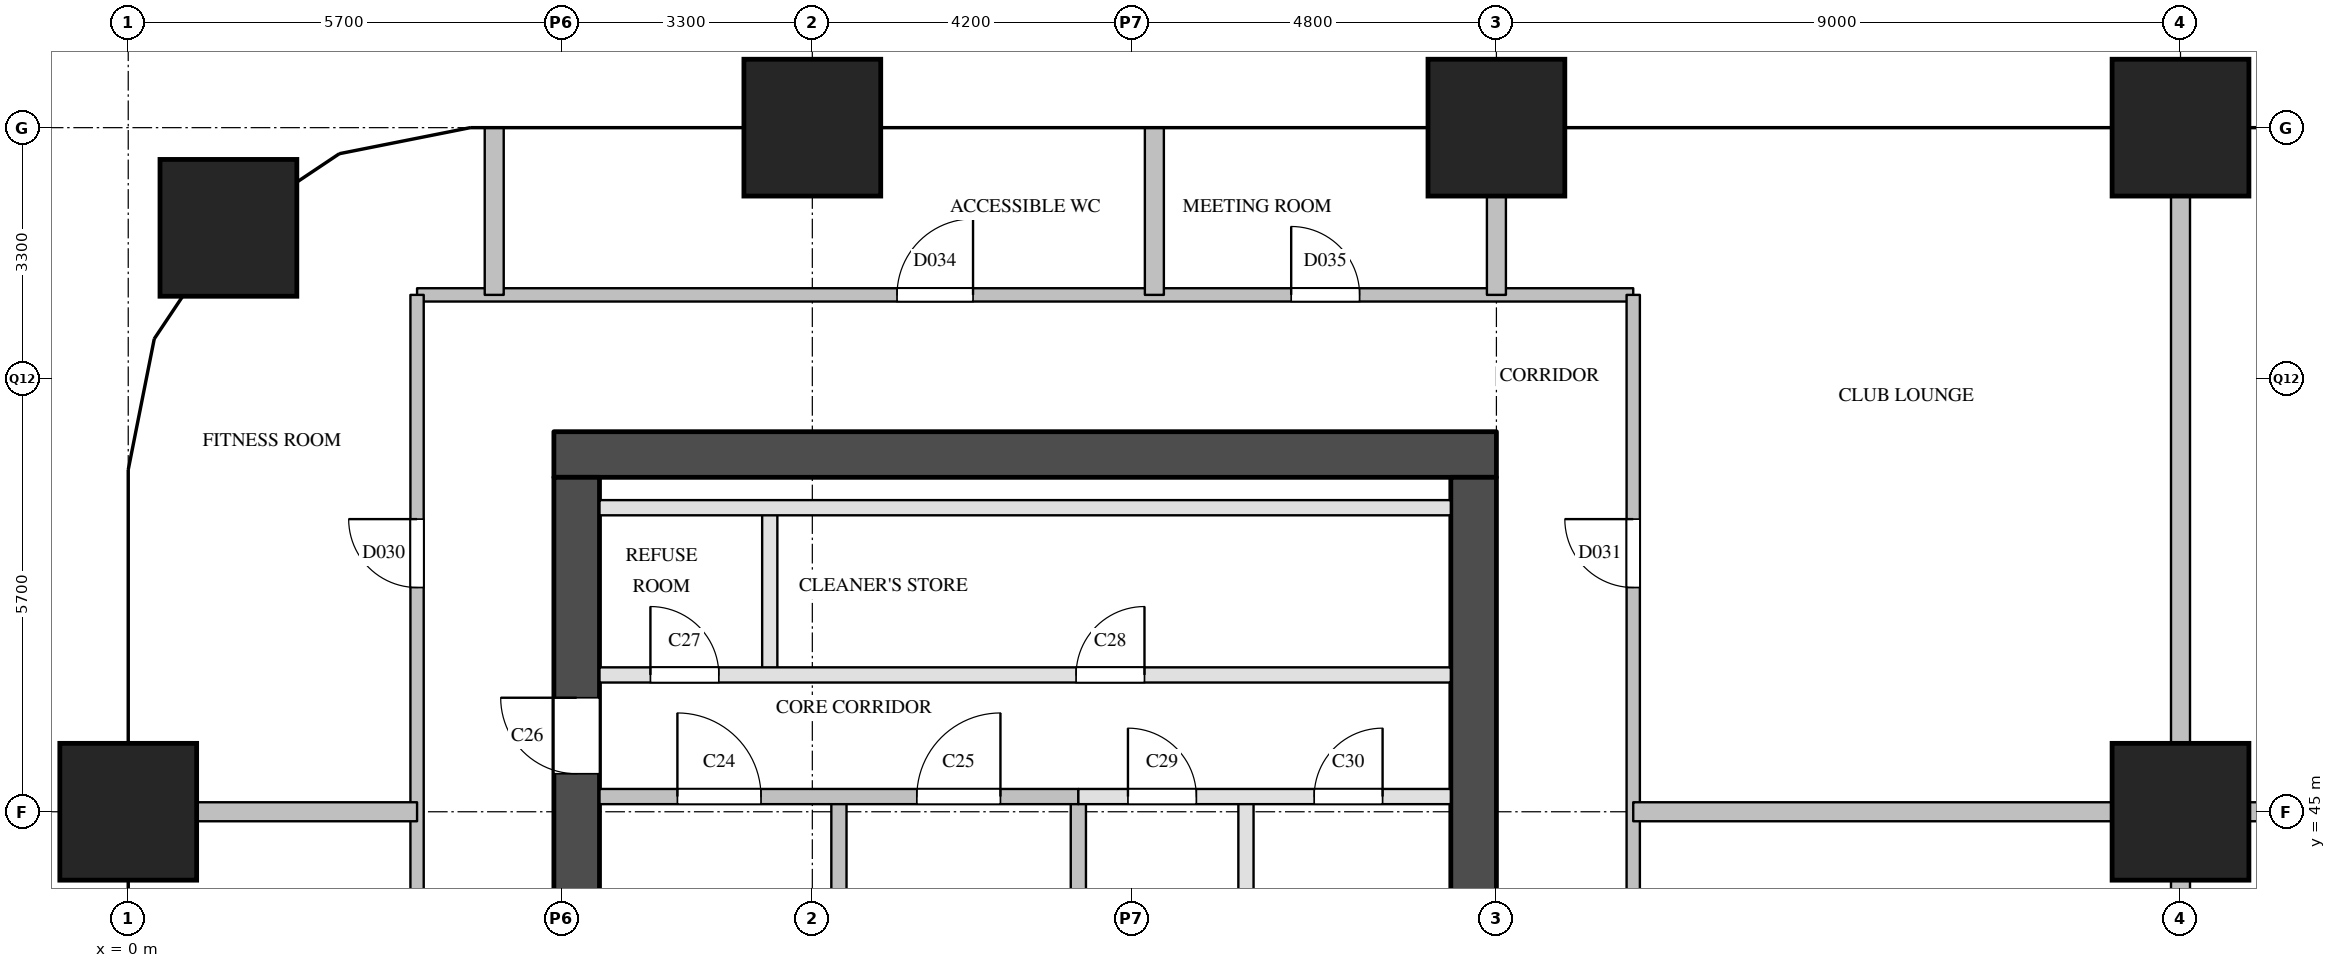
"""IFC4 building model, lengths in metres.
Left out: names, types, materials, properties, quantities, classifications, styles, units other than length and angle.
Written with IfcOpenShell. Run it as: python <this file> out.ifc"""

import sys

from ifc_helpers import new_model, si_unit, direction, frame, frame_2d, origin, origin_2d, place, context, subcontext, project, spatial, rectangle, extrude, element, fill, save


model = new_model("IFC4")
c1 = context("Model", 3, precision=1e-05, world=origin(), true_north=direction((0.0, 1.0)))
c2 = subcontext(c1, "Body", "Model", "MODEL_VIEW")
j1 = project(units=[si_unit("LENGTHUNIT", "METRE"), si_unit("PLANEANGLEUNIT", "RADIAN")], contexts=[c1])
p1 = place(None, origin())
s1 = spatial("IfcSite", under=j1, at=p1, CompositionType="ELEMENT")
p2 = place(p1, origin())
s2 = spatial("IfcBuilding", under=s1, at=p2, CompositionType="ELEMENT")
p3 = place(p2, frame((0.0, 0.0, 96.8)))
s3 = spatial("IfcBuildingStorey", under=s2, at=p3, CompositionType="ELEMENT", Elevation=96.8)
for number, where, z_axis, x_axis in (
    (1, (0.0, 45.0, 0.0), (0.0, 0.0, 1.0), (1.0, 0.0, 0.0)),
    (2, (1.318, 52.682, 0.0), (0.0, 0.0, 1.0), (1.0, 0.0, 0.0)),
    (3, (9.0, 54.0, 0.0), (0.0, 0.0, 1.0), (1.0, 0.0, 0.0)),
    (4, (18.0, 54.0, 0.0), (0.0, 0.0, 1.0), (1.0, 0.0, 0.0)),
    (5, (27.0, 45.0, 0.0), (0.0, 0.0, 1.0), (1.0, 0.0, 0.0)),
    (6, (27.0, 54.0, 0.0), (0.0, 0.0, 1.0), (1.0, 0.0, 0.0)),
):
    element("IfcColumn", number, at=place(p3, frame(where, z_axis=z_axis, x_axis=x_axis)), inside=s3, PredefinedType="COLUMN", context=c2, shape_type="SweptSolid", body=[
        extrude(rectangle(XDim=1.8, YDim=1.8, at=origin_2d()), origin(), (0.0, 0.0, 1.0), 3.8),
    ])
p4 = place(p3, frame((5.6, 49.7, 0.0), z_axis=(0.0, 0.0, 1.0), x_axis=(1.0, 0.0, 0.0)))
e7 = element("IfcWall", 7, at=p4, inside=s3, PredefinedType="SHEAR", context=c2, shape_type="SweptSolid", body=[
    extrude(rectangle(XDim=12.4, YDim=0.6, at=frame_2d((6.2, 0.0))), origin(), (0.0, 0.0, 1.0), 3.5),
])
p5 = place(p3, frame((5.9, 29.1, 0.0), z_axis=(0.0, 0.0, 1.0), x_axis=(0.0, 1.0, 0.0)))
e8 = element("IfcWall", 8, at=p5, inside=s3, PredefinedType="SHEAR", context=c2, shape_type="SweptSolid", body=[
    extrude(rectangle(XDim=20.3, YDim=0.6, at=frame_2d((10.15, 0.0))), origin(), (0.0, 0.0, 1.0), 3.5),
])
p6 = place(p5, frame((3.6, 0.0, 0.0)))
e9 = element("IfcOpeningElement", 9, at=p6, cuts=e8, PredefinedType="OPENING", context=c2, shape_type="SweptSolid", body=[
    extrude(rectangle(XDim=1.8, YDim=2.1, at=frame_2d((0.9, 1.05))), frame((0.0, 0.31, 0.0), z_axis=(0.0, -1.0, 0.0), x_axis=(1.0, 0.0, 0.0)), (0.0, 0.0, 1.0), 0.62),
])
p7 = place(p5, frame((16.4, 0.0, 0.0)))
e10 = element("IfcOpeningElement", 10, at=p7, cuts=e8, PredefinedType="OPENING", context=c2, shape_type="SweptSolid", body=[
    extrude(rectangle(XDim=1.0, YDim=2.1, at=frame_2d((0.5, 1.05))), frame((0.0, 0.31, 0.0), z_axis=(0.0, -1.0, 0.0), x_axis=(1.0, 0.0, 0.0)), (0.0, 0.0, 1.0), 0.62),
])
p8 = place(p3, frame((17.7, 29.1, 0.0), z_axis=(0.0, 0.0, 1.0), x_axis=(0.0, 1.0, 0.0)))
e11 = element("IfcWall", 11, at=p8, inside=s3, PredefinedType="SHEAR", context=c2, shape_type="SweptSolid", body=[
    extrude(rectangle(XDim=20.3, YDim=0.6, at=frame_2d((10.15, 0.0))), origin(), (0.0, 0.0, 1.0), 3.5),
])
p9 = place(p8, frame((1.25, 0.0, 0.0)))
e12 = element("IfcOpeningElement", 12, at=p9, cuts=e11, PredefinedType="OPENING", context=c2, shape_type="SweptSolid", body=[
    extrude(rectangle(XDim=0.7, YDim=2.1, at=frame_2d((0.35, 1.05))), frame((0.0, 0.31, 0.0), z_axis=(0.0, -1.0, 0.0), x_axis=(1.0, 0.0, 0.0)), (0.0, 0.0, 1.0), 0.62),
])
p10 = place(p8, frame((7.05, 0.0, 0.0)))
e13 = element("IfcOpeningElement", 13, at=p10, cuts=e11, PredefinedType="OPENING", context=c2, shape_type="SweptSolid", body=[
    extrude(rectangle(XDim=0.7, YDim=2.1, at=frame_2d((0.35, 1.05))), frame((0.0, 0.31, 0.0), z_axis=(0.0, -1.0, 0.0), x_axis=(1.0, 0.0, 0.0)), (0.0, 0.0, 1.0), 0.62),
])
p11 = place(p3, frame((8.44, 46.8, 0.0), z_axis=(0.0, 0.0, 1.0), x_axis=(0.0, 1.0, 0.0)))
e14 = element("IfcWall", 14, at=p11, inside=s3, PredefinedType="PARTITIONING", context=c2, shape_type="SweptSolid", body=[
    extrude(rectangle(XDim=2.2, YDim=0.2, at=frame_2d((1.1, 0.0))), origin(), (0.0, 0.0, 1.0), 3.5),
])
for number, where, z_axis, x_axis in (
    (15, (9.35, 40.9, 0.0), (0.0, 0.0, 1.0), (0.0, 1.0, 0.0)),
    (16, (12.5, 40.9, 0.0), (0.0, 0.0, 1.0), (0.0, 1.0, 0.0)),
):
    element("IfcWall", number, at=place(p3, frame(where, z_axis=z_axis, x_axis=x_axis)), inside=s3, PredefinedType="SOLIDWALL", context=c2, shape_type="SweptSolid", body=[
        extrude(rectangle(XDim=4.3, YDim=0.2, at=frame_2d((2.15, 0.0))), origin(), (0.0, 0.0, 1.0), 3.5),
    ])
p12 = place(p3, frame((14.705, 39.0, 0.0), z_axis=(0.0, 0.0, 1.0), x_axis=(0.0, 1.0, 0.0)))
e17 = element("IfcWall", 17, at=p12, inside=s3, PredefinedType="PARTITIONING", context=c2, shape_type="SweptSolid", body=[
    extrude(rectangle(XDim=6.2, YDim=0.2, at=frame_2d((3.1, 0.0))), origin(), (0.0, 0.0, 1.0), 3.5),
])
p13 = place(p3, frame((12.5, 45.2, 0.0), z_axis=(0.0, 0.0, 1.0), x_axis=(1.0, 0.0, 0.0)))
e18 = element("IfcWall", 18, at=p13, inside=s3, PredefinedType="PARTITIONING", context=c2, shape_type="SweptSolid", body=[
    extrude(rectangle(XDim=4.9, YDim=0.2, at=frame_2d((2.45, 0.0))), origin(), (0.0, 0.0, 1.0), 3.5),
])
p14 = place(p13, frame((0.653, 0.0, 0.0)))
e19 = element("IfcOpeningElement", 19, at=p14, cuts=e18, PredefinedType="OPENING", context=c2, shape_type="SweptSolid", body=[
    extrude(rectangle(XDim=0.9, YDim=2.1, at=frame_2d((0.45, 1.05))), frame((0.0, 0.11, 0.0), z_axis=(0.0, -1.0, 0.0), x_axis=(1.0, 0.0, 0.0)), (0.0, 0.0, 1.0), 0.22),
])
p15 = place(p13, frame((3.103, 0.0, 0.0)))
e20 = element("IfcOpeningElement", 20, at=p15, cuts=e18, PredefinedType="OPENING", context=c2, shape_type="SweptSolid", body=[
    extrude(rectangle(XDim=0.9, YDim=2.1, at=frame_2d((0.45, 1.05))), frame((0.0, 0.11, 0.0), z_axis=(0.0, -1.0, 0.0), x_axis=(1.0, 0.0, 0.0)), (0.0, 0.0, 1.0), 0.22),
])
p16 = place(p3, frame((6.2, 45.2, 0.0), z_axis=(0.0, 0.0, 1.0), x_axis=(1.0, 0.0, 0.0)))
e21 = element("IfcWall", 21, at=p16, inside=s3, PredefinedType="SOLIDWALL", context=c2, shape_type="SweptSolid", body=[
    extrude(rectangle(XDim=6.3, YDim=0.2, at=frame_2d((3.15, 0.0))), origin(), (0.0, 0.0, 1.0), 3.5),
])
p17 = place(p16, frame((1.025, 0.0, 0.0)))
e22 = element("IfcOpeningElement", 22, at=p17, cuts=e21, PredefinedType="OPENING", context=c2, shape_type="SweptSolid", body=[
    extrude(rectangle(XDim=1.1, YDim=2.1, at=frame_2d((0.55, 1.05))), frame((0.0, 0.11, 0.0), z_axis=(0.0, -1.0, 0.0), x_axis=(1.0, 0.0, 0.0)), (0.0, 0.0, 1.0), 0.22),
])
p18 = place(p16, frame((4.175, 0.0, 0.0)))
e23 = element("IfcOpeningElement", 23, at=p18, cuts=e21, PredefinedType="OPENING", context=c2, shape_type="SweptSolid", body=[
    extrude(rectangle(XDim=1.1, YDim=2.1, at=frame_2d((0.55, 1.05))), frame((0.0, 0.11, 0.0), z_axis=(0.0, -1.0, 0.0), x_axis=(1.0, 0.0, 0.0)), (0.0, 0.0, 1.0), 0.22),
])
p19 = place(p3, frame((6.2, 46.8, 0.0), z_axis=(0.0, 0.0, 1.0), x_axis=(1.0, 0.0, 0.0)))
e24 = element("IfcWall", 24, at=p19, inside=s3, PredefinedType="PARTITIONING", context=c2, shape_type="SweptSolid", body=[
    extrude(rectangle(XDim=11.2, YDim=0.2, at=frame_2d((5.6, 0.0))), origin(), (0.0, 0.0, 1.0), 3.5),
])
p20 = place(p19, frame((0.67, 0.0, 0.0)))
e25 = element("IfcOpeningElement", 25, at=p20, cuts=e24, PredefinedType="OPENING", context=c2, shape_type="SweptSolid", body=[
    extrude(rectangle(XDim=0.9, YDim=2.1, at=frame_2d((0.45, 1.05))), frame((0.0, 0.11, 0.0), z_axis=(0.0, -1.0, 0.0), x_axis=(1.0, 0.0, 0.0)), (0.0, 0.0, 1.0), 0.22),
])
p21 = place(p19, frame((6.27, 0.0, 0.0)))
e26 = element("IfcOpeningElement", 26, at=p21, cuts=e24, PredefinedType="OPENING", context=c2, shape_type="SweptSolid", body=[
    extrude(rectangle(XDim=0.9, YDim=2.1, at=frame_2d((0.45, 1.05))), frame((0.0, 0.11, 0.0), z_axis=(0.0, -1.0, 0.0), x_axis=(1.0, 0.0, 0.0)), (0.0, 0.0, 1.0), 0.22),
])
p22 = place(p3, frame((6.2, 49.0, 0.0), z_axis=(0.0, 0.0, 1.0), x_axis=(1.0, 0.0, 0.0)))
e27 = element("IfcWall", 27, at=p22, inside=s3, PredefinedType="PARTITIONING", context=c2, shape_type="SweptSolid", body=[
    extrude(rectangle(XDim=11.2, YDim=0.2, at=frame_2d((5.6, 0.0))), origin(), (0.0, 0.0, 1.0), 3.5),
])
p23 = place(p3, frame((3.8, 51.8, 0.0), z_axis=(0.0, 0.0, 1.0), x_axis=(1.0, 0.0, 0.0)))
e28 = element("IfcWall", 28, at=p23, inside=s3, PredefinedType="PARTITIONING", context=c2, shape_type="SweptSolid", body=[
    extrude(rectangle(XDim=16.0, YDim=0.175, at=frame_2d((8.0, 0.0))), origin(), (0.0, 0.0, 1.0), 3.5),
])
p24 = place(p23, frame((6.314, 0.0, 0.0)))
e29 = element("IfcOpeningElement", 29, at=p24, cuts=e28, PredefinedType="OPENING", context=c2, shape_type="SweptSolid", body=[
    extrude(rectangle(XDim=1.0, YDim=2.1, at=frame_2d((0.5, 1.05))), frame((0.0, 0.097, 0.0), z_axis=(0.0, -1.0, 0.0), x_axis=(1.0, 0.0, 0.0)), (0.0, 0.0, 1.0), 0.195),
])
p25 = place(p23, frame((11.5, 0.0, 0.0)))
e30 = element("IfcOpeningElement", 30, at=p25, cuts=e28, PredefinedType="OPENING", context=c2, shape_type="SweptSolid", body=[
    extrude(rectangle(XDim=0.9, YDim=2.1, at=frame_2d((0.45, 1.05))), frame((0.0, 0.097, 0.0), z_axis=(0.0, -1.0, 0.0), x_axis=(1.0, 0.0, 0.0)), (0.0, 0.0, 1.0), 0.195),
])
p26 = place(p3, frame((3.8, 28.5, 0.0), z_axis=(0.0, 0.0, 1.0), x_axis=(0.0, 1.0, 0.0)))
e31 = element("IfcWall", 31, at=p26, inside=s3, PredefinedType="PARTITIONING", context=c2, shape_type="SweptSolid", body=[
    extrude(rectangle(XDim=23.3, YDim=0.175, at=frame_2d((11.65, 0.0))), origin(), (0.0, 0.0, 1.0), 3.5),
])
p27 = place(p26, frame((3.3, 0.0, 0.0)))
e32 = element("IfcOpeningElement", 32, at=p27, cuts=e31, PredefinedType="OPENING", context=c2, shape_type="SweptSolid", body=[
    extrude(rectangle(XDim=0.9, YDim=2.1, at=frame_2d((0.45, 1.05))), frame((0.0, 0.097, 0.0), z_axis=(0.0, -1.0, 0.0), x_axis=(1.0, 0.0, 0.0)), (0.0, 0.0, 1.0), 0.195),
])
p28 = place(p26, frame((11.55, 0.0, 0.0)))
e33 = element("IfcOpeningElement", 33, at=p28, cuts=e31, PredefinedType="OPENING", context=c2, shape_type="SweptSolid", body=[
    extrude(rectangle(XDim=0.9, YDim=2.1, at=frame_2d((0.45, 1.05))), frame((0.0, 0.097, 0.0), z_axis=(0.0, -1.0, 0.0), x_axis=(1.0, 0.0, 0.0)), (0.0, 0.0, 1.0), 0.195),
])
p29 = place(p26, frame((19.45, 0.0, 0.0)))
e34 = element("IfcOpeningElement", 34, at=p29, cuts=e31, PredefinedType="OPENING", context=c2, shape_type="SweptSolid", body=[
    extrude(rectangle(XDim=0.9, YDim=2.1, at=frame_2d((0.45, 1.05))), frame((0.0, 0.097, 0.0), z_axis=(0.0, -1.0, 0.0), x_axis=(1.0, 0.0, 0.0)), (0.0, 0.0, 1.0), 0.195),
])
p30 = place(p3, frame((19.8, 28.5, 0.0), z_axis=(0.0, 0.0, 1.0), x_axis=(0.0, 1.0, 0.0)))
e35 = element("IfcWall", 35, at=p30, inside=s3, PredefinedType="PARTITIONING", context=c2, shape_type="SweptSolid", body=[
    extrude(rectangle(XDim=23.3, YDim=0.175, at=frame_2d((11.65, 0.0))), origin(), (0.0, 0.0, 1.0), 3.5),
])
p31 = place(p30, frame((3.3, 0.0, 0.0)))
e36 = element("IfcOpeningElement", 36, at=p31, cuts=e35, PredefinedType="OPENING", context=c2, shape_type="SweptSolid", body=[
    extrude(rectangle(XDim=0.9, YDim=2.1, at=frame_2d((0.45, 1.05))), frame((0.0, 0.097, 0.0), z_axis=(0.0, -1.0, 0.0), x_axis=(1.0, 0.0, 0.0)), (0.0, 0.0, 1.0), 0.195),
])
p32 = place(p30, frame((11.5, 0.0, 0.0)))
e37 = element("IfcOpeningElement", 37, at=p32, cuts=e35, PredefinedType="OPENING", context=c2, shape_type="SweptSolid", body=[
    extrude(rectangle(XDim=1.0, YDim=2.1, at=frame_2d((0.5, 1.05))), frame((0.0, 0.097, 0.0), z_axis=(0.0, -1.0, 0.0), x_axis=(1.0, 0.0, 0.0)), (0.0, 0.0, 1.0), 0.195),
])
p33 = place(p30, frame((19.45, 0.0, 0.0)))
e38 = element("IfcOpeningElement", 38, at=p33, cuts=e35, PredefinedType="OPENING", context=c2, shape_type="SweptSolid", body=[
    extrude(rectangle(XDim=0.9, YDim=2.1, at=frame_2d((0.45, 1.05))), frame((0.0, 0.097, 0.0), z_axis=(0.0, -1.0, 0.0), x_axis=(1.0, 0.0, 0.0)), (0.0, 0.0, 1.0), 0.195),
])
p34 = place(p3, frame((0.0, 45.0, 0.0), z_axis=(0.0, 0.0, 1.0), x_axis=(1.0, 0.0, 0.0)))
e39 = element("IfcWall", 39, at=p34, inside=s3, PredefinedType="PARTITIONING", context=c2, shape_type="SweptSolid", body=[
    extrude(rectangle(XDim=3.8, YDim=0.25, at=frame_2d((1.9, 0.0))), origin(), (0.0, 0.0, 1.0), 3.5),
])
p35 = place(p3, frame((19.8, 45.0, 0.0), z_axis=(0.0, 0.0, 1.0), x_axis=(1.0, 0.0, 0.0)))
e40 = element("IfcWall", 40, at=p35, inside=s3, PredefinedType="PARTITIONING", context=c2, shape_type="SweptSolid", body=[
    extrude(rectangle(XDim=14.4, YDim=0.25, at=frame_2d((7.2, 0.0))), origin(), (0.0, 0.0, 1.0), 3.5),
])
for number, where, z_axis, x_axis in (
    (41, (4.815, 51.8, 0.0), (0.0, 0.0, 1.0), (0.0, 1.0, 0.0)),
    (42, (13.5, 51.8, 0.0), (0.0, 0.0, 1.0), (0.0, 1.0, 0.0)),
):
    element("IfcWall", number, at=place(p3, frame(where, z_axis=z_axis, x_axis=x_axis)), inside=s3, PredefinedType="PARTITIONING", context=c2, shape_type="SweptSolid", body=[
        extrude(rectangle(XDim=2.2, YDim=0.25, at=frame_2d((1.1, 0.0))), origin(), (0.0, 0.0, 1.0), 2.5),
    ])
p36 = place(p3, frame((18.0, 51.8, 0.0), z_axis=(0.0, 0.0, 1.0), x_axis=(0.0, 1.0, 0.0)))
e43 = element("IfcWall", 43, at=p36, inside=s3, PredefinedType="PARTITIONING", context=c2, shape_type="SweptSolid", body=[
    extrude(rectangle(XDim=2.2, YDim=0.25, at=frame_2d((1.1, 0.0))), origin(), (0.0, 0.0, 1.0), 3.5),
])
p37 = place(p3, frame((27.0, 36.0, 0.0), z_axis=(0.0, 0.0, 1.0), x_axis=(0.0, 1.0, 0.0)))
e44 = element("IfcWall", 44, at=p37, inside=s3, PredefinedType="PARTITIONING", context=c2, shape_type="SweptSolid", body=[
    extrude(rectangle(XDim=18.0, YDim=0.25, at=frame_2d((9.0, 0.0))), origin(), (0.0, 0.0, 1.0), 2.5),
])
p38 = place(p17, origin())
e45 = element("IfcDoor", 45, at=p38, inside=s3, OperationType="SINGLE_SWING_LEFT", PredefinedType="DOOR", context=c2, shape_type="SweptSolid", body=[
    extrude(rectangle(XDim=1.1, YDim=2.1, at=frame_2d((0.55, 1.05))), frame((0.0, 0.025, 0.0), z_axis=(0.0, -1.0, 0.0), x_axis=(1.0, 0.0, 0.0)), (0.0, 0.0, 1.0), 0.05),
])
fill(e22, e45)
p39 = place(p18, origin())
e46 = element("IfcDoor", 46, at=p39, inside=s3, OperationType="SINGLE_SWING_RIGHT", PredefinedType="DOOR", context=c2, shape_type="SweptSolid", body=[
    extrude(rectangle(XDim=1.1, YDim=2.1, at=frame_2d((0.55, 1.05))), frame((0.0, 0.025, 0.0), z_axis=(0.0, -1.0, 0.0), x_axis=(1.0, 0.0, 0.0)), (0.0, 0.0, 1.0), 0.05),
])
fill(e23, e46)
p40 = place(p7, origin())
e47 = element("IfcDoor", 47, at=p40, inside=s3, OperationType="SINGLE_SWING_RIGHT", PredefinedType="DOOR", context=c2, shape_type="SweptSolid", body=[
    extrude(rectangle(XDim=1.0, YDim=2.1, at=frame_2d((0.5, 1.05))), frame((0.0, 0.025, 0.0), z_axis=(0.0, -1.0, 0.0), x_axis=(1.0, 0.0, 0.0)), (0.0, 0.0, 1.0), 0.05),
])
fill(e10, e47)
p41 = place(p20, origin())
e48 = element("IfcDoor", 48, at=p41, inside=s3, OperationType="SINGLE_SWING_LEFT", PredefinedType="DOOR", context=c2, shape_type="SweptSolid", body=[
    extrude(rectangle(XDim=0.9, YDim=2.1, at=frame_2d((0.45, 1.05))), frame((0.0, 0.025, 0.0), z_axis=(0.0, -1.0, 0.0), x_axis=(1.0, 0.0, 0.0)), (0.0, 0.0, 1.0), 0.05),
])
fill(e25, e48)
p42 = place(p21, origin())
e49 = element("IfcDoor", 49, at=p42, inside=s3, OperationType="SINGLE_SWING_RIGHT", PredefinedType="DOOR", context=c2, shape_type="SweptSolid", body=[
    extrude(rectangle(XDim=0.9, YDim=2.1, at=frame_2d((0.45, 1.05))), frame((0.0, 0.025, 0.0), z_axis=(0.0, -1.0, 0.0), x_axis=(1.0, 0.0, 0.0)), (0.0, 0.0, 1.0), 0.05),
])
fill(e26, e49)
p43 = place(p14, origin())
e50 = element("IfcDoor", 50, at=p43, inside=s3, OperationType="SINGLE_SWING_LEFT", PredefinedType="DOOR", context=c2, shape_type="SweptSolid", body=[
    extrude(rectangle(XDim=0.9, YDim=2.1, at=frame_2d((0.45, 1.05))), frame((0.0, 0.025, 0.0), z_axis=(0.0, -1.0, 0.0), x_axis=(1.0, 0.0, 0.0)), (0.0, 0.0, 1.0), 0.05),
])
fill(e19, e50)
p44 = place(p15, origin())
e51 = element("IfcDoor", 51, at=p44, inside=s3, OperationType="SINGLE_SWING_RIGHT", PredefinedType="DOOR", context=c2, shape_type="SweptSolid", body=[
    extrude(rectangle(XDim=0.9, YDim=2.1, at=frame_2d((0.45, 1.05))), frame((0.0, 0.025, 0.0), z_axis=(0.0, -1.0, 0.0), x_axis=(1.0, 0.0, 0.0)), (0.0, 0.0, 1.0), 0.05),
])
fill(e20, e51)
p45 = place(p29, origin())
e52 = element("IfcDoor", 52, at=p45, inside=s3, OperationType="SINGLE_SWING_RIGHT", PredefinedType="DOOR", context=c2, shape_type="SweptSolid", body=[
    extrude(rectangle(XDim=0.9, YDim=2.1, at=frame_2d((0.45, 1.05))), frame((0.0, 0.025, 0.0), z_axis=(0.0, -1.0, 0.0), x_axis=(1.0, 0.0, 0.0)), (0.0, 0.0, 1.0), 0.05),
])
fill(e34, e52)
p46 = place(p33, origin())
e53 = element("IfcDoor", 53, at=p46, inside=s3, OperationType="SINGLE_SWING_RIGHT", PredefinedType="DOOR", context=c2, shape_type="SweptSolid", body=[
    extrude(rectangle(XDim=0.9, YDim=2.1, at=frame_2d((0.45, 1.05))), frame((0.0, 0.025, 0.0), z_axis=(0.0, -1.0, 0.0), x_axis=(1.0, 0.0, 0.0)), (0.0, 0.0, 1.0), 0.05),
])
fill(e38, e53)
p47 = place(p24, origin())
e54 = element("IfcDoor", 54, at=p47, inside=s3, OperationType="SINGLE_SWING_RIGHT", PredefinedType="DOOR", context=c2, shape_type="SweptSolid", body=[
    extrude(rectangle(XDim=1.0, YDim=2.1, at=frame_2d((0.5, 1.05))), frame((0.0, 0.025, 0.0), z_axis=(0.0, -1.0, 0.0), x_axis=(1.0, 0.0, 0.0)), (0.0, 0.0, 1.0), 0.05),
])
fill(e29, e54)
p48 = place(p25, origin())
e55 = element("IfcDoor", 55, at=p48, inside=s3, OperationType="SINGLE_SWING_LEFT", PredefinedType="DOOR", context=c2, shape_type="SweptSolid", body=[
    extrude(rectangle(XDim=0.9, YDim=2.1, at=frame_2d((0.45, 1.05))), frame((0.0, 0.025, 0.0), z_axis=(0.0, -1.0, 0.0), x_axis=(1.0, 0.0, 0.0)), (0.0, 0.0, 1.0), 0.05),
])
fill(e30, e55)
save(model, sys.argv[1])
